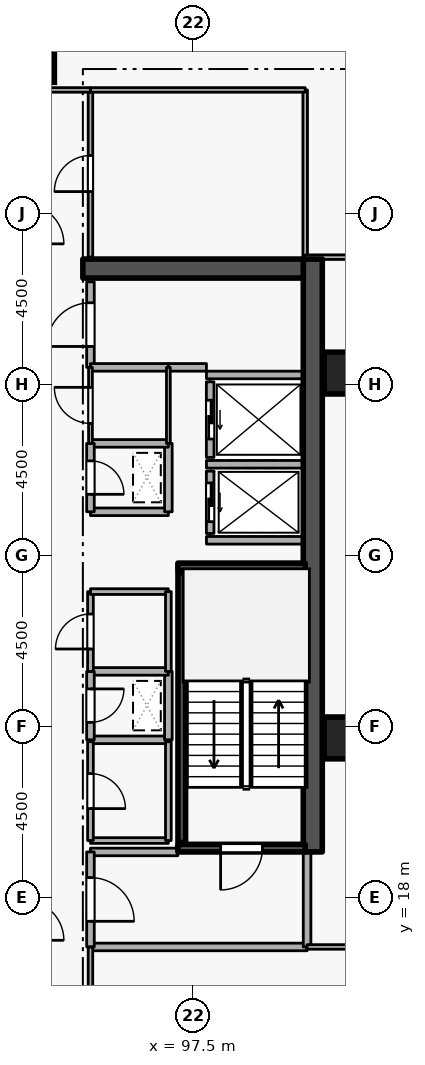
"""IFC4 building model, lengths in metres.
Left out: names, types, materials, properties, quantities, classifications, styles, units other than length and angle.
Written with IfcOpenShell. Run it as: python <this file> out.ifc"""

import sys

from ifc_helpers import new_model, si_unit, direction, frame, frame_2d, origin, origin_2d, place, context, subcontext, project, spatial, rectangle, extrude, element, fill, save


model = new_model("IFC4")
c1 = context("Model", 3, precision=1e-05, world=origin(), true_north=direction((0.0, 1.0)))
c2 = subcontext(c1, "Body", "Model", "MODEL_VIEW")
j1 = project(units=[si_unit("LENGTHUNIT", "METRE"), si_unit("PLANEANGLEUNIT", "RADIAN")], contexts=[c1])
p1 = place(None, origin())
s1 = spatial("IfcSite", under=j1, at=p1, CompositionType="ELEMENT")
p2 = place(p1, origin())
s2 = spatial("IfcBuilding", under=s1, at=p2, CompositionType="ELEMENT")
p3 = place(p2, frame((0.0, 0.0, 178.5)))
s3 = spatial("IfcBuildingStorey", under=s2, at=p3, CompositionType="ELEMENT", Elevation=178.5)
p4 = place(p3, frame((100.65, 19.2, 0.0), z_axis=(0.0, 0.0, 1.0), x_axis=(0.0, 1.0, 0.0)))
e1 = element("IfcWall", 1, at=p4, inside=s3, PredefinedType="SHEAR", context=c2, shape_type="SweptSolid", body=[
    extrude(rectangle(XDim=15.6, YDim=0.5, at=frame_2d((7.8, 0.0))), origin(), (0.0, 0.0, 1.0), 3.6),
])
p5 = place(p3, frame((94.6, 34.55, 0.0), z_axis=(0.0, 0.0, 1.0), x_axis=(1.0, 0.0, 0.0)))
e2 = element("IfcWall", 2, at=p5, inside=s3, PredefinedType="SHEAR", context=c2, shape_type="SweptSolid", body=[
    extrude(rectangle(XDim=5.8, YDim=0.5, at=frame_2d((2.9, 0.0))), origin(), (0.0, 0.0, 1.0), 3.6),
])
for number, where, z_axis, x_axis in (
    (3, (93.3, 40.0, 0.0), (0.0, 0.0, 1.0), (1.0, 0.0, 0.0)),
    (4, (101.5, 22.2, 0.0), (0.0, 0.0, 1.0), (1.0, 0.0, 0.0)),
    (5, (101.5, 31.8, 0.0), (0.0, 0.0, 1.0), (1.0, 0.0, 0.0)),
):
    element("IfcColumn", number, at=place(p3, frame(where, z_axis=z_axis, x_axis=x_axis)), inside=s3, PredefinedType="COLUMN", context=c2, shape_type="SweptSolid", body=[
        extrude(rectangle(XDim=1.1, YDim=1.1, at=origin_2d()), origin(), (0.0, 0.0, 1.0), 3.6),
    ])
p6 = place(p3, frame((97.95, 29.22, 0.0), z_axis=(0.0, 0.0, 1.0), x_axis=(0.0, -1.0, 0.0)))
e6 = element("IfcWall", 6, at=p6, inside=s3, PredefinedType="STANDARD", context=c2, shape_type="SweptSolid", body=[
    extrude(rectangle(XDim=1.64, YDim=0.2, at=frame_2d((0.82, 0.0))), origin(), (0.0, 0.0, 1.0), 3.34),
])
p7 = place(p6, frame((0.31, 0.0, 0.0)))
e7 = element("IfcOpeningElement", 7, at=p7, cuts=e6, PredefinedType="OPENING", context=c2, shape_type="SweptSolid", body=[
    extrude(rectangle(XDim=1.02, YDim=2.06, at=frame_2d((0.51, 1.03))), frame((0.0, 0.11, 0.0), z_axis=(0.0, -1.0, 0.0), x_axis=(1.0, 0.0, 0.0)), (0.0, 0.0, 1.0), 0.22),
])
p8 = place(p3, frame((97.95, 31.57, 0.0), z_axis=(0.0, 0.0, 1.0), x_axis=(0.0, -1.0, 0.0)))
e8 = element("IfcWall", 8, at=p8, inside=s3, PredefinedType="STANDARD", context=c2, shape_type="SweptSolid", body=[
    extrude(rectangle(XDim=1.99, YDim=0.2, at=frame_2d((0.995, 0.0))), origin(), (0.0, 0.0, 1.0), 3.34),
])
p9 = place(p8, frame((0.485, 0.0, 0.0)))
e9 = element("IfcOpeningElement", 9, at=p9, cuts=e8, PredefinedType="OPENING", context=c2, shape_type="SweptSolid", body=[
    extrude(rectangle(XDim=1.02, YDim=2.06, at=frame_2d((0.51, 1.03))), frame((0.0, 0.11, 0.0), z_axis=(0.0, -1.0, 0.0), x_axis=(1.0, 0.0, 0.0)), (0.0, 0.0, 1.0), 0.22),
])
for number, where, z_axis, x_axis in (
    (10, (97.852, 29.4, 0.0), (0.0, 0.0, 1.0), (1.0, 0.0, 0.0)),
    (11, (97.852, 27.4, 0.0), (0.0, 0.0, 1.0), (1.0, 0.0, 0.0)),
    (12, (97.852, 31.75, 0.0), (0.0, 0.0, 1.0), (1.0, 0.0, 0.0)),
):
    element("IfcWall", number, at=place(p3, frame(where, z_axis=z_axis, x_axis=x_axis)), inside=s3, PredefinedType="STANDARD", context=c2, shape_type="SweptSolid", body=[
        extrude(rectangle(XDim=2.536, YDim=0.2, at=frame_2d((1.268, 0.0))), origin(), (0.0, 0.0, 1.0), 3.34),
    ])
p10 = place(p3, frame((100.45, 19.3, 0.0), z_axis=(0.0, 0.0, 1.0), x_axis=(-1.0, 0.0, 0.0)))
e13 = element("IfcWall", 13, at=p10, inside=s3, PredefinedType="SHEAR", context=c2, shape_type="SweptSolid", body=[
    extrude(rectangle(XDim=3.35, YDim=0.2, at=frame_2d((1.675, 0.0))), origin(), (0.0, 0.0, 1.0), 3.6),
])
p11 = place(p10, frame((1.125, 0.0, 0.0)))
e14 = element("IfcOpeningElement", 14, at=p11, cuts=e13, PredefinedType="OPENING", context=c2, shape_type="SweptSolid", body=[
    extrude(rectangle(XDim=1.1, YDim=2.1, at=frame_2d((0.55, 1.05))), frame((0.0, 0.11, 0.0), z_axis=(0.0, -1.0, 0.0), x_axis=(1.0, 0.0, 0.0)), (0.0, 0.0, 1.0), 0.22),
])
p12 = place(p3, frame((97.1, 26.7, 0.0), z_axis=(0.0, 0.0, 1.0), x_axis=(1.0, 0.0, 0.0)))
e15 = element("IfcWall", 15, at=p12, inside=s3, PredefinedType="SHEAR", context=c2, shape_type="SweptSolid", body=[
    extrude(rectangle(XDim=3.35, YDim=0.2, at=frame_2d((1.675, 0.0))), origin(), (0.0, 0.0, 1.0), 3.6),
])
p13 = place(p3, frame((97.203, 26.55, 0.0), z_axis=(0.0, 0.0, 1.0), x_axis=(0.0, -1.0, 0.0)))
e16 = element("IfcWall", 16, at=p13, inside=s3, PredefinedType="SHEAR", context=c2, shape_type="SweptSolid", body=[
    extrude(rectangle(XDim=7.1, YDim=0.2, at=frame_2d((3.55, 0.0))), origin(), (0.0, 0.0, 1.0), 3.6),
])
p14 = place(p3, frame((94.8, 16.7, 0.0), z_axis=(0.0, 0.0, 1.0), x_axis=(1.0, 0.0, 0.0)))
e17 = element("IfcWall", 17, at=p14, inside=s3, PredefinedType="STANDARD", context=c2, shape_type="SweptSolid", body=[
    extrude(rectangle(XDim=5.7, YDim=0.2, at=frame_2d((2.85, 0.0))), origin(), (0.0, 0.0, 1.0), 3.34),
])
p15 = place(p3, frame((100.5, 16.7, 0.0), z_axis=(0.0, 0.0, 1.0), x_axis=(0.0, 1.0, 0.0)))
e18 = element("IfcWall", 18, at=p15, inside=s3, PredefinedType="STANDARD", context=c2, shape_type="SweptSolid", body=[
    extrude(rectangle(XDim=2.5, YDim=0.2, at=frame_2d((1.25, 0.0))), origin(), (0.0, 0.0, 1.0), 3.34),
])
p16 = place(p3, frame((97.1, 19.2, 0.0), z_axis=(0.0, 0.0, 1.0), x_axis=(-1.0, 0.0, 0.0)))
e19 = element("IfcWall", 19, at=p16, inside=s3, PredefinedType="STANDARD", context=c2, shape_type="SweptSolid", body=[
    extrude(rectangle(XDim=2.3, YDim=0.2, at=frame_2d((1.15, 0.0))), origin(), (0.0, 0.0, 1.0), 2.545),
])
p17 = place(p3, frame((94.8, 19.2, 0.0), z_axis=(0.0, 0.0, 1.0), x_axis=(0.0, -1.0, 0.0)))
e20 = element("IfcWall", 20, at=p17, inside=s3, PredefinedType="STANDARD", context=c2, shape_type="SweptSolid", body=[
    extrude(rectangle(XDim=2.5, YDim=0.2, at=frame_2d((1.25, 0.0))), origin(), (0.0, 0.0, 1.0), 3.34),
])
p18 = place(p17, frame((0.675, 0.0, 0.0)))
e21 = element("IfcOpeningElement", 21, at=p18, cuts=e20, PredefinedType="OPENING", context=c2, shape_type="SweptSolid", body=[
    extrude(rectangle(XDim=1.15, YDim=2.1, at=frame_2d((0.575, 1.05))), frame((0.0, 0.11, 0.0), z_axis=(0.0, -1.0, 0.0), x_axis=(1.0, 0.0, 0.0)), (0.0, 0.0, 1.0), 0.22),
])
p19 = place(p3, frame((94.8, 28.15, 0.0), z_axis=(0.0, 0.0, 1.0), x_axis=(1.0, 0.0, 0.0)))
e22 = element("IfcWall", 22, at=p19, inside=s3, PredefinedType="STANDARD", context=c2, shape_type="SweptSolid", body=[
    extrude(rectangle(XDim=2.05, YDim=0.2, at=frame_2d((1.025, 0.0))), origin(), (0.0, 0.0, 1.0), 3.34),
])
p20 = place(p3, frame((96.85, 28.15, 0.0), z_axis=(0.0, 0.0, 1.0), x_axis=(0.0, 1.0, 0.0)))
e23 = element("IfcWall", 23, at=p20, inside=s3, PredefinedType="STANDARD", context=c2, shape_type="SweptSolid", body=[
    extrude(rectangle(XDim=1.8, YDim=0.2, at=frame_2d((0.9, 0.0))), origin(), (0.0, 0.0, 1.0), 3.34),
])
p21 = place(p3, frame((96.85, 29.95, 0.0), z_axis=(0.0, 0.0, 1.0), x_axis=(-1.0, 0.0, 0.0)))
e24 = element("IfcWall", 24, at=p21, inside=s3, PredefinedType="STANDARD", context=c2, shape_type="SweptSolid", body=[
    extrude(rectangle(XDim=2.05, YDim=0.2, at=frame_2d((1.025, 0.0))), origin(), (0.0, 0.0, 1.0), 3.34),
])
p22 = place(p3, frame((94.8, 29.95, 0.0), z_axis=(0.0, 0.0, 1.0), x_axis=(0.0, -1.0, 0.0)))
e25 = element("IfcWall", 25, at=p22, inside=s3, PredefinedType="STANDARD", context=c2, shape_type="SweptSolid", body=[
    extrude(rectangle(XDim=1.8, YDim=0.2, at=frame_2d((0.9, 0.0))), origin(), (0.0, 0.0, 1.0), 3.34),
])
p23 = place(p22, frame((0.46, 0.0, 0.0)))
e26 = element("IfcOpeningElement", 26, at=p23, cuts=e25, PredefinedType="OPENING", context=c2, shape_type="SweptSolid", body=[
    extrude(rectangle(XDim=0.88, YDim=2.04, at=frame_2d((0.44, 1.02))), frame((0.0, 0.11, 0.0), z_axis=(0.0, -1.0, 0.0), x_axis=(1.0, 0.0, 0.0)), (0.0, 0.0, 1.0), 0.22),
])
p24 = place(p3, frame((94.8, 22.15, 0.0), z_axis=(0.0, 0.0, 1.0), x_axis=(1.0, 0.0, 0.0)))
e27 = element("IfcWall", 27, at=p24, inside=s3, PredefinedType="STANDARD", context=c2, shape_type="SweptSolid", body=[
    extrude(rectangle(XDim=2.05, YDim=0.2, at=frame_2d((1.025, 0.0))), origin(), (0.0, 0.0, 1.0), 3.34),
])
p25 = place(p3, frame((96.85, 22.15, 0.0), z_axis=(0.0, 0.0, 1.0), x_axis=(0.0, 1.0, 0.0)))
e28 = element("IfcWall", 28, at=p25, inside=s3, PredefinedType="STANDARD", context=c2, shape_type="SweptSolid", body=[
    extrude(rectangle(XDim=1.8, YDim=0.2, at=frame_2d((0.9, 0.0))), origin(), (0.0, 0.0, 1.0), 3.34),
])
p26 = place(p3, frame((96.85, 23.95, 0.0), z_axis=(0.0, 0.0, 1.0), x_axis=(-1.0, 0.0, 0.0)))
e29 = element("IfcWall", 29, at=p26, inside=s3, PredefinedType="STANDARD", context=c2, shape_type="SweptSolid", body=[
    extrude(rectangle(XDim=2.05, YDim=0.2, at=frame_2d((1.025, 0.0))), origin(), (0.0, 0.0, 1.0), 3.34),
])
p27 = place(p3, frame((94.8, 23.95, 0.0), z_axis=(0.0, 0.0, 1.0), x_axis=(0.0, -1.0, 0.0)))
e30 = element("IfcWall", 30, at=p27, inside=s3, PredefinedType="STANDARD", context=c2, shape_type="SweptSolid", body=[
    extrude(rectangle(XDim=1.8, YDim=0.2, at=frame_2d((0.9, 0.0))), origin(), (0.0, 0.0, 1.0), 3.34),
])
p28 = place(p27, frame((0.46, 0.0, 0.0)))
e31 = element("IfcOpeningElement", 31, at=p28, cuts=e30, PredefinedType="OPENING", context=c2, shape_type="SweptSolid", body=[
    extrude(rectangle(XDim=0.88, YDim=2.04, at=frame_2d((0.44, 1.02))), frame((0.0, 0.11, 0.0), z_axis=(0.0, -1.0, 0.0), x_axis=(1.0, 0.0, 0.0)), (0.0, 0.0, 1.0), 0.22),
])
p29 = place(p3, frame((94.8, 31.95, 0.0), z_axis=(0.0, 0.0, 1.0), x_axis=(0.0, 1.0, 0.0)))
e32 = element("IfcWall", 32, at=p29, inside=s3, PredefinedType="STANDARD", context=c2, shape_type="SweptSolid", body=[
    extrude(rectangle(XDim=2.25, YDim=0.2, at=frame_2d((1.125, 0.0))), origin(), (0.0, 0.0, 1.0), 3.34),
])
p30 = place(p29, frame((0.55, 0.0, 0.0)))
e33 = element("IfcOpeningElement", 33, at=p30, cuts=e32, PredefinedType="OPENING", context=c2, shape_type="SweptSolid", body=[
    extrude(rectangle(XDim=1.15, YDim=2.1, at=frame_2d((0.575, 1.05))), frame((0.0, 0.11, 0.0), z_axis=(0.0, -1.0, 0.0), x_axis=(1.0, 0.0, 0.0)), (0.0, 0.0, 1.0), 0.22),
])
p31 = place(p3, frame((97.852, 31.95, 0.0), z_axis=(0.0, 0.0, 1.0), x_axis=(-1.0, 0.0, 0.0)))
e34 = element("IfcWall", 34, at=p31, inside=s3, PredefinedType="STANDARD", context=c2, shape_type="SweptSolid", body=[
    extrude(rectangle(XDim=1.002, YDim=0.2, at=frame_2d((0.501, 0.0))), origin(), (0.0, 0.0, 1.0), 3.34),
])
p32 = place(p3, frame((96.85, 31.95, 0.0), z_axis=(0.0, 0.0, 1.0), x_axis=(-1.0, 0.0, 0.0)))
e35 = element("IfcWall", 35, at=p32, inside=s3, PredefinedType="STANDARD", context=c2, shape_type="SweptSolid", body=[
    extrude(rectangle(XDim=2.05, YDim=0.2, at=frame_2d((1.025, 0.0))), origin(), (0.0, 0.0, 1.0), 3.34),
])
p33 = place(p3, frame((94.8, 19.5, 0.0), z_axis=(0.0, 0.0, 1.0), x_axis=(1.0, 0.0, 0.0)))
e36 = element("IfcWall", 36, at=p33, inside=s3, PredefinedType="PARTITIONING", context=c2, shape_type="SweptSolid", body=[
    extrude(rectangle(XDim=2.05, YDim=0.15, at=frame_2d((1.025, 0.0))), origin(), (0.0, 0.0, 1.0), 2.545),
])
p34 = place(p3, frame((96.85, 19.5, 0.0), z_axis=(0.0, 0.0, 1.0), x_axis=(0.0, 1.0, 0.0)))
e37 = element("IfcWall", 37, at=p34, inside=s3, PredefinedType="PARTITIONING", context=c2, shape_type="SweptSolid", body=[
    extrude(rectangle(XDim=2.6, YDim=0.15, at=frame_2d((1.3, 0.0))), origin(), (0.0, 0.0, 1.0), 3.34),
])
p35 = place(p3, frame((94.8, 22.1, 0.0), z_axis=(0.0, 0.0, 1.0), x_axis=(0.0, -1.0, 0.0)))
e38 = element("IfcWall", 38, at=p35, inside=s3, PredefinedType="PARTITIONING", context=c2, shape_type="SweptSolid", body=[
    extrude(rectangle(XDim=2.6, YDim=0.15, at=frame_2d((1.3, 0.0))), origin(), (0.0, 0.0, 1.0), 3.34),
])
p36 = place(p35, frame((0.84, 0.0, 0.0)))
e39 = element("IfcOpeningElement", 39, at=p36, cuts=e38, PredefinedType="OPENING", context=c2, shape_type="SweptSolid", body=[
    extrude(rectangle(XDim=0.92, YDim=2.08, at=frame_2d((0.46, 1.04))), frame((0.0, 0.085, 0.0), z_axis=(0.0, -1.0, 0.0), x_axis=(1.0, 0.0, 0.0)), (0.0, 0.0, 1.0), 0.17),
])
p37 = place(p3, frame((94.8, 23.95, 0.0), z_axis=(0.0, 0.0, 1.0), x_axis=(0.0, 1.0, 0.0)))
e40 = element("IfcWall", 40, at=p37, inside=s3, PredefinedType="PARTITIONING", context=c2, shape_type="SweptSolid", body=[
    extrude(rectangle(XDim=2.1, YDim=0.15, at=frame_2d((1.05, 0.0))), origin(), (0.0, 0.0, 1.0), 3.34),
])
p38 = place(p37, frame((0.59, 0.0, 0.0)))
e41 = element("IfcOpeningElement", 41, at=p38, cuts=e40, PredefinedType="OPENING", context=c2, shape_type="SweptSolid", body=[
    extrude(rectangle(XDim=0.92, YDim=2.08, at=frame_2d((0.46, 1.04))), frame((0.0, 0.085, 0.0), z_axis=(0.0, -1.0, 0.0), x_axis=(1.0, 0.0, 0.0)), (0.0, 0.0, 1.0), 0.17),
])
p39 = place(p3, frame((94.8, 26.05, 0.0), z_axis=(0.0, 0.0, 1.0), x_axis=(1.0, 0.0, 0.0)))
e42 = element("IfcWall", 42, at=p39, inside=s3, PredefinedType="PARTITIONING", context=c2, shape_type="SweptSolid", body=[
    extrude(rectangle(XDim=2.05, YDim=0.15, at=frame_2d((1.025, 0.0))), origin(), (0.0, 0.0, 1.0), 3.34),
])
p40 = place(p3, frame((96.85, 26.05, 0.0), z_axis=(0.0, 0.0, 1.0), x_axis=(0.0, -1.0, 0.0)))
e43 = element("IfcWall", 43, at=p40, inside=s3, PredefinedType="PARTITIONING", context=c2, shape_type="SweptSolid", body=[
    extrude(rectangle(XDim=2.1, YDim=0.15, at=frame_2d((1.05, 0.0))), origin(), (0.0, 0.0, 1.0), 3.34),
])
p41 = place(p3, frame((94.8, 29.95, 0.0), z_axis=(0.0, 0.0, 1.0), x_axis=(0.0, 1.0, 0.0)))
e44 = element("IfcWall", 44, at=p41, inside=s3, PredefinedType="PARTITIONING", context=c2, shape_type="SweptSolid", body=[
    extrude(rectangle(XDim=2.0, YDim=0.1, at=frame_2d((1.0, 0.0))), origin(), (0.0, 0.0, 1.0), 3.34),
])
p42 = place(p41, frame((0.525, 0.0, 0.0)))
e45 = element("IfcOpeningElement", 45, at=p42, cuts=e44, PredefinedType="OPENING", context=c2, shape_type="SweptSolid", body=[
    extrude(rectangle(XDim=0.95, YDim=2.1, at=frame_2d((0.475, 1.05))), frame((0.0, 0.06, 0.0), z_axis=(0.0, -1.0, 0.0), x_axis=(1.0, 0.0, 0.0)), (0.0, 0.0, 1.0), 0.12),
])
p43 = place(p3, frame((96.85, 31.95, 0.0), z_axis=(0.0, 0.0, 1.0), x_axis=(0.0, -1.0, 0.0)))
e46 = element("IfcWall", 46, at=p43, inside=s3, PredefinedType="PARTITIONING", context=c2, shape_type="SweptSolid", body=[
    extrude(rectangle(XDim=2.0, YDim=0.1, at=frame_2d((1.0, 0.0))), origin(), (0.0, 0.0, 1.0), 3.34),
])
p44 = place(p3, frame((100.45, 39.25, 0.0), z_axis=(0.0, 0.0, 1.0), x_axis=(0.0, -1.0, 0.0)))
e47 = element("IfcWall", 47, at=p44, inside=s3, PredefinedType="PARTITIONING", context=c2, shape_type="SweptSolid", body=[
    extrude(rectangle(XDim=4.4, YDim=0.12, at=frame_2d((2.2, 0.0))), origin(), (0.0, 0.0, 1.0), 3.34),
])
p45 = place(p3, frame((94.8, 34.85, 0.0), z_axis=(0.0, 0.0, 1.0), x_axis=(0.0, 1.0, 0.0)))
e48 = element("IfcWall", 48, at=p45, inside=s3, PredefinedType="PARTITIONING", context=c2, shape_type="SweptSolid", body=[
    extrude(rectangle(XDim=4.4, YDim=0.12, at=frame_2d((2.2, 0.0))), origin(), (0.0, 0.0, 1.0), 3.34),
])
p46 = place(p45, frame((1.725, 0.0, 0.0)))
e49 = element("IfcOpeningElement", 49, at=p46, cuts=e48, PredefinedType="OPENING", context=c2, shape_type="SweptSolid", body=[
    extrude(rectangle(XDim=0.95, YDim=2.1, at=frame_2d((0.475, 1.05))), frame((0.0, 0.07, 0.0), z_axis=(0.0, -1.0, 0.0), x_axis=(1.0, 0.0, 0.0)), (0.0, 0.0, 1.0), 0.14),
])
p47 = place(p3, frame((94.8, 39.25, 0.0), z_axis=(0.0, 0.0, 1.0), x_axis=(1.0, 0.0, 0.0)))
e50 = element("IfcWall", 50, at=p47, inside=s3, PredefinedType="PARTITIONING", context=c2, shape_type="SweptSolid", body=[
    extrude(rectangle(XDim=5.65, YDim=0.12, at=frame_2d((2.825, 0.0))), origin(), (0.0, 0.0, 1.0), 3.34),
])
p48 = place(p3, frame((94.8, 14.75, 0.0), z_axis=(0.0, 0.0, 1.0), x_axis=(0.0, 1.0, 0.0)))
e51 = element("IfcWall", 51, at=p48, inside=s3, PredefinedType="PARTITIONING", context=c2, shape_type="SweptSolid", body=[
    extrude(rectangle(XDim=1.95, YDim=0.12, at=frame_2d((0.975, 0.0))), origin(), (0.0, 0.0, 1.0), 3.34),
])
p49 = place(p3, frame((100.5, 16.7, 0.0), z_axis=(0.0, 0.0, 1.0), x_axis=(1.0, 0.0, 0.0)))
e52 = element("IfcWall", 52, at=p49, inside=s3, PredefinedType="PARTITIONING", context=c2, shape_type="SweptSolid", body=[
    extrude(rectangle(XDim=5.72, YDim=0.12, at=frame_2d((2.86, 0.0))), origin(), (0.0, 0.0, 1.0), 3.34),
])
p50 = place(p3, frame((94.8, 39.25, 0.0), z_axis=(0.0, 0.0, 1.0), x_axis=(-1.0, 0.0, 0.0)))
e53 = element("IfcWall", 53, at=p50, inside=s3, PredefinedType="PARTITIONING", context=c2, shape_type="SweptSolid", body=[
    extrude(rectangle(XDim=1.75, YDim=0.12, at=frame_2d((0.875, 0.0))), origin(), (0.0, 0.0, 1.0), 3.34),
])
p51 = place(p3, frame((106.22, 34.85, 0.0), z_axis=(0.0, 0.0, 1.0), x_axis=(-1.0, 0.0, 0.0)))
e54 = element("IfcWall", 54, at=p51, inside=s3, PredefinedType="PARTITIONING", context=c2, shape_type="SweptSolid", body=[
    extrude(rectangle(XDim=5.77, YDim=0.12, at=frame_2d((2.885, 0.0))), origin(), (0.0, 0.0, 1.0), 2.545),
])
p52 = place(p7, origin())
e55 = element("IfcDoor", 55, at=p52, inside=s3, OperationType="SLIDING_TO_LEFT", PredefinedType="DOOR", context=c2, shape_type="SweptSolid", body=[
    extrude(rectangle(XDim=1.02, YDim=2.06, at=frame_2d((0.51, 1.03))), frame((0.0, 0.025, 0.0), z_axis=(0.0, -1.0, 0.0), x_axis=(1.0, 0.0, 0.0)), (0.0, 0.0, 1.0), 0.05),
])
fill(e7, e55)
p53 = place(p9, origin())
e56 = element("IfcDoor", 56, at=p53, inside=s3, OperationType="SLIDING_TO_LEFT", PredefinedType="DOOR", context=c2, shape_type="SweptSolid", body=[
    extrude(rectangle(XDim=1.02, YDim=2.06, at=frame_2d((0.51, 1.03))), frame((0.0, 0.025, 0.0), z_axis=(0.0, -1.0, 0.0), x_axis=(1.0, 0.0, 0.0)), (0.0, 0.0, 1.0), 0.05),
])
fill(e9, e56)
p54 = place(p11, origin())
e57 = element("IfcDoor", 57, at=p54, inside=s3, OperationType="SINGLE_SWING_RIGHT", PredefinedType="DOOR", context=c2, shape_type="SweptSolid", body=[
    extrude(rectangle(XDim=1.1, YDim=2.1, at=frame_2d((0.55, 1.05))), frame((0.0, 0.025, 0.0), z_axis=(0.0, -1.0, 0.0), x_axis=(1.0, 0.0, 0.0)), (0.0, 0.0, 1.0), 0.05),
])
fill(e14, e57)
p55 = place(p18, origin())
e58 = element("IfcDoor", 58, at=p55, inside=s3, OperationType="SINGLE_SWING_RIGHT", PredefinedType="DOOR", context=c2, shape_type="SweptSolid", body=[
    extrude(rectangle(XDim=1.15, YDim=2.1, at=frame_2d((0.575, 1.05))), frame((0.0, 0.025, 0.0), z_axis=(0.0, -1.0, 0.0), x_axis=(1.0, 0.0, 0.0)), (0.0, 0.0, 1.0), 0.05),
])
fill(e21, e58)
p56 = place(p23, origin())
e59 = element("IfcDoor", 59, at=p56, inside=s3, OperationType="SINGLE_SWING_RIGHT", PredefinedType="DOOR", context=c2, shape_type="SweptSolid", body=[
    extrude(rectangle(XDim=0.88, YDim=2.04, at=frame_2d((0.44, 1.02))), frame((0.0, 0.025, 0.0), z_axis=(0.0, -1.0, 0.0), x_axis=(1.0, 0.0, 0.0)), (0.0, 0.0, 1.0), 0.05),
])
fill(e26, e59)
p57 = place(p28, origin())
e60 = element("IfcDoor", 60, at=p57, inside=s3, OperationType="SINGLE_SWING_LEFT", PredefinedType="DOOR", context=c2, shape_type="SweptSolid", body=[
    extrude(rectangle(XDim=0.88, YDim=2.04, at=frame_2d((0.44, 1.02))), frame((0.0, 0.025, 0.0), z_axis=(0.0, -1.0, 0.0), x_axis=(1.0, 0.0, 0.0)), (0.0, 0.0, 1.0), 0.05),
])
fill(e31, e60)
p58 = place(p36, origin())
e61 = element("IfcDoor", 61, at=p58, inside=s3, OperationType="SINGLE_SWING_RIGHT", PredefinedType="DOOR", context=c2, shape_type="SweptSolid", body=[
    extrude(rectangle(XDim=0.92, YDim=2.08, at=frame_2d((0.46, 1.04))), frame((0.0, 0.025, 0.0), z_axis=(0.0, -1.0, 0.0), x_axis=(1.0, 0.0, 0.0)), (0.0, 0.0, 1.0), 0.05),
])
fill(e39, e61)
p59 = place(p38, origin())
e62 = element("IfcDoor", 62, at=p59, inside=s3, OperationType="SINGLE_SWING_LEFT", PredefinedType="DOOR", context=c2, shape_type="SweptSolid", body=[
    extrude(rectangle(XDim=0.92, YDim=2.08, at=frame_2d((0.46, 1.04))), frame((0.0, 0.025, 0.0), z_axis=(0.0, -1.0, 0.0), x_axis=(1.0, 0.0, 0.0)), (0.0, 0.0, 1.0), 0.05),
])
fill(e41, e62)
p60 = place(p42, origin())
e63 = element("IfcDoor", 63, at=p60, inside=s3, OperationType="SINGLE_SWING_RIGHT", PredefinedType="DOOR", context=c2, shape_type="SweptSolid", body=[
    extrude(rectangle(XDim=0.95, YDim=2.1, at=frame_2d((0.475, 1.05))), frame((0.0, 0.025, 0.0), z_axis=(0.0, -1.0, 0.0), x_axis=(1.0, 0.0, 0.0)), (0.0, 0.0, 1.0), 0.05),
])
fill(e45, e63)
p61 = place(p30, origin())
e64 = element("IfcDoor", 64, at=p61, inside=s3, OperationType="SINGLE_SWING_LEFT", PredefinedType="DOOR", context=c2, shape_type="SweptSolid", body=[
    extrude(rectangle(XDim=1.15, YDim=2.1, at=frame_2d((0.575, 1.05))), frame((0.0, 0.025, 0.0), z_axis=(0.0, -1.0, 0.0), x_axis=(1.0, 0.0, 0.0)), (0.0, 0.0, 1.0), 0.05),
])
fill(e33, e64)
p62 = place(p46, origin())
e65 = element("IfcDoor", 65, at=p62, inside=s3, OperationType="SINGLE_SWING_LEFT", PredefinedType="DOOR", context=c2, shape_type="SweptSolid", body=[
    extrude(rectangle(XDim=0.95, YDim=2.1, at=frame_2d((0.475, 1.05))), frame((0.0, 0.025, 0.0), z_axis=(0.0, -1.0, 0.0), x_axis=(1.0, 0.0, 0.0)), (0.0, 0.0, 1.0), 0.05),
])
fill(e49, e65)
save(model, sys.argv[1])
